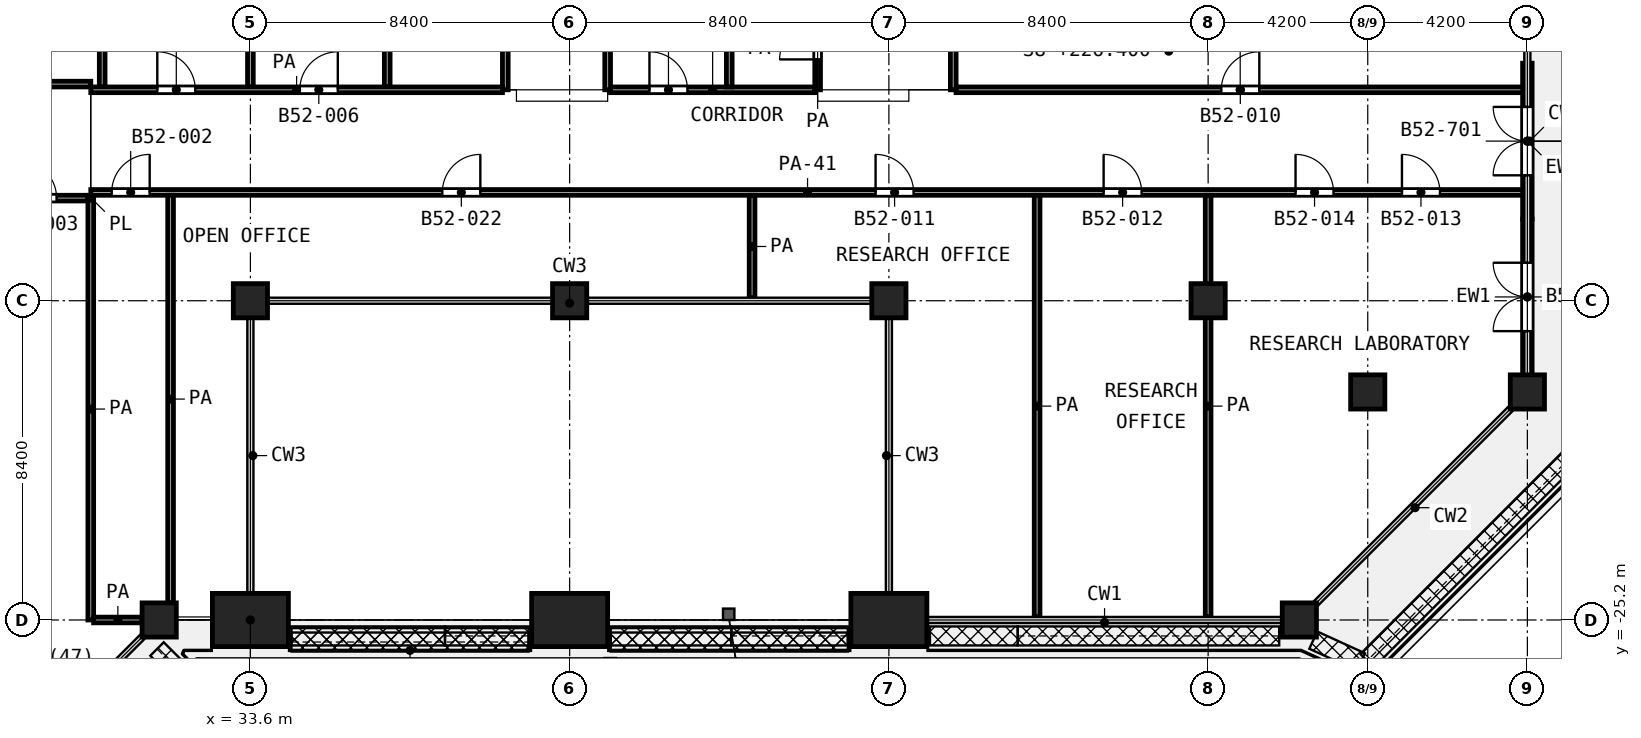
"""IFC4 building model, lengths in metres.
Left out: names, types, materials, properties, quantities, classifications, styles, units other than length and angle.
Written with IfcOpenShell. Run it as: python <this file> out.ifc"""

import sys

from ifc_helpers import new_model, si_unit, direction, frame, frame_2d, origin, origin_2d, place, context, subcontext, project, spatial, rectangle, extrude, element, fill, save


model = new_model("IFC4")
c1 = context("Model", 3, precision=1e-05, world=origin(), true_north=direction((0.0, 1.0)))
c2 = subcontext(c1, "Body", "Model", "MODEL_VIEW")
j1 = project(units=[si_unit("LENGTHUNIT", "METRE"), si_unit("PLANEANGLEUNIT", "RADIAN")], contexts=[c1])
p1 = place(None, origin())
s1 = spatial("IfcSite", under=j1, at=p1, CompositionType="ELEMENT")
p2 = place(p1, origin())
s2 = spatial("IfcBuilding", under=s1, at=p2, CompositionType="ELEMENT")
p3 = place(p2, frame((0.0, 0.0, 226.4)))
s3 = spatial("IfcBuildingStorey", under=s2, at=p3, CompositionType="ELEMENT", Elevation=226.4)
for number, where, z_axis, x_axis in (
    (1, (33.6, -16.8, 0.0), (0.0, 0.0, 1.0), (1.0, 0.0, 0.0)),
    (2, (42.0, -16.8, 0.0), (0.0, 0.0, 1.0), (1.0, 0.0, 0.0)),
    (3, (50.4, -16.8, 0.0), (0.0, 0.0, 1.0), (1.0, 0.0, 0.0)),
    (4, (58.8, -16.8, 0.0), (0.0, 0.0, 1.0), (1.0, 0.0, 0.0)),
    (5, (63.0, -19.2, 0.0), (0.0, 0.0, 1.0), (1.0, 0.0, 0.0)),
    (6, (67.2, -19.2, 0.0), (0.0, 0.0, 1.0), (1.0, 0.0, 0.0)),
    (7, (31.2, -25.2, 0.0), (0.0, 0.0, 1.0), (1.0, 0.0, 0.0)),
):
    element("IfcColumn", number, at=place(p3, frame(where, z_axis=z_axis, x_axis=x_axis)), inside=s3, PredefinedType="COLUMN", context=c2, shape_type="SweptSolid", body=[
        extrude(rectangle(XDim=0.9, YDim=0.9, at=origin_2d()), origin(), (0.0, 0.0, 1.0), 4.2),
    ])
for number, where, z_axis, x_axis in (
    (8, (42.0, -25.2, 0.0), (0.0, 0.0, 1.0), (-1.0, 0.0, 0.0)),
    (9, (50.4, -25.2, 0.0), (0.0, 0.0, 1.0), (-1.0, 0.0, 0.0)),
):
    element("IfcColumn", number, at=place(p3, frame(where, z_axis=z_axis, x_axis=x_axis)), inside=s3, PredefinedType="COLUMN", context=c2, shape_type="SweptSolid", body=[
        extrude(rectangle(XDim=2.0, YDim=1.4, at=origin_2d()), origin(), (0.0, 0.0, 1.0), 4.2),
    ])
p4 = place(p3, frame((61.2, -25.2, 0.0), z_axis=(0.0, 0.0, 1.0), x_axis=(1.0, 0.0, 0.0)))
e10 = element("IfcColumn", 10, at=p4, inside=s3, PredefinedType="COLUMN", context=c2, shape_type="SweptSolid", body=[
    extrude(rectangle(XDim=0.9, YDim=0.9, at=origin_2d()), origin(), (0.0, 0.0, 1.0), 4.2),
])
p5 = place(p3, frame((33.6, -25.2, 0.0), z_axis=(0.0, 0.0, 1.0), x_axis=(-1.0, 0.0, 0.0)))
e11 = element("IfcColumn", 11, at=p5, inside=s3, PredefinedType="COLUMN", context=c2, shape_type="SweptSolid", body=[
    extrude(rectangle(XDim=2.0, YDim=1.4, at=origin_2d()), origin(), (0.0, 0.0, 1.0), 4.2),
])
p6 = place(p3, frame((67.2, -18.75, 0.0), z_axis=(0.0, 0.0, 1.0), x_axis=(0.0, 1.0, 0.0)))
e12 = element("IfcWall", 12, at=p6, inside=s3, PredefinedType="SOLIDWALL", context=c2, shape_type="SweptSolid", body=[
    extrude(rectangle(XDim=4.1, YDim=0.25, at=frame_2d((2.05, 0.0))), origin(), (0.0, 0.0, 1.0), 3.48),
])
p7 = place(p6, frame((1.15, 0.0, 0.0)))
e13 = element("IfcOpeningElement", 13, at=p7, cuts=e12, PredefinedType="OPENING", context=c2, shape_type="SweptSolid", body=[
    extrude(rectangle(XDim=1.8, YDim=2.1, at=frame_2d((0.9, 1.05))), frame((0.0, 0.135, 0.0), z_axis=(0.0, -1.0, 0.0), x_axis=(1.0, 0.0, 0.0)), (0.0, 0.0, 1.0), 0.27),
])
p8 = place(p3, frame((67.2, -14.65, 0.0), z_axis=(0.0, 0.0, 1.0), x_axis=(0.0, 1.0, 0.0)))
e14 = element("IfcWall", 14, at=p8, inside=s3, PredefinedType="SOLIDWALL", context=c2, shape_type="SweptSolid", body=[
    extrude(rectangle(XDim=4.1, YDim=0.25, at=frame_2d((2.05, 0.0))), origin(), (0.0, 0.0, 1.0), 3.48),
])
p9 = place(p8, frame((1.15, 0.0, 0.0)))
e15 = element("IfcOpeningElement", 15, at=p9, cuts=e14, PredefinedType="OPENING", context=c2, shape_type="SweptSolid", body=[
    extrude(rectangle(XDim=1.8, YDim=2.1, at=frame_2d((0.9, 1.05))), frame((0.0, 0.135, 0.0), z_axis=(0.0, -1.0, 0.0), x_axis=(1.0, 0.0, 0.0)), (0.0, 0.0, 1.0), 0.27),
])
p10 = place(p3, frame((29.4, -14.147, 0.0), z_axis=(0.0, 0.0, 1.0), x_axis=(0.0, 1.0, 0.0)))
e16 = element("IfcWall", 16, at=p10, inside=s3, PredefinedType="PARTITIONING", context=c2, shape_type="SweptSolid", body=[
    extrude(rectangle(XDim=0.12, YDim=0.1, at=frame_2d((0.06, 0.0))), origin(), (0.0, 0.0, 1.0), 3.6),
])
p11 = place(p3, frame((29.475, -25.2, 0.0), z_axis=(0.0, 0.0, 1.0), x_axis=(1.0, 0.0, 0.0)))
e17 = element("IfcWall", 17, at=p11, inside=s3, PredefinedType="PARTITIONING", context=c2, shape_type="SweptSolid", body=[
    extrude(rectangle(XDim=1.275, YDim=0.15, at=frame_2d((0.637, 0.0))), origin(), (0.0, 0.0, 1.0), 3.6),
])
p12 = place(p3, frame((24.8, -14.1, 0.0), z_axis=(0.0, 0.0, 1.0), x_axis=(1.0, 0.0, 0.0)))
e18 = element("IfcWall", 18, at=p12, inside=s3, PredefinedType="PARTITIONING", context=c2, shape_type="SweptSolid", body=[
    extrude(rectangle(XDim=4.525, YDim=0.15, at=frame_2d((2.262, 0.0))), origin(), (0.0, 0.0, 1.0), 3.6),
])
p13 = place(p12, frame((2.7, 0.0, 0.0)))
e19 = element("IfcOpeningElement", 19, at=p13, cuts=e18, PredefinedType="OPENING", context=c2, shape_type="SweptSolid", body=[
    extrude(rectangle(XDim=1.0, YDim=2.1, at=frame_2d((0.5, 1.05))), frame((0.0, 0.085, 0.0), z_axis=(0.0, -1.0, 0.0), x_axis=(1.0, 0.0, 0.0)), (0.0, 0.0, 1.0), 0.17),
])
p14 = place(p12, frame((1.3, 0.0, 0.0)))
e20 = element("IfcOpeningElement", 20, at=p14, cuts=e18, PredefinedType="OPENING", context=c2, shape_type="SweptSolid", body=[
    extrude(rectangle(XDim=1.0, YDim=2.1, at=frame_2d((0.5, 1.05))), frame((0.0, 0.085, 0.0), z_axis=(0.0, -1.0, 0.0), x_axis=(1.0, 0.0, 0.0)), (0.0, 0.0, 1.0), 0.17),
])
p15 = place(p3, frame((29.4, -13.95, 0.0), z_axis=(0.0, 0.0, 1.0), x_axis=(1.0, 0.0, 0.0)))
e21 = element("IfcWall", 21, at=p15, inside=s3, PredefinedType="PARTITIONING", context=c2, shape_type="SweptSolid", body=[
    extrude(rectangle(XDim=37.72, YDim=0.15, at=frame_2d((18.86, 0.0))), origin(), (0.0, 0.0, 1.0), 2.7),
])
p16 = place(p15, frame((20.65, 0.0, 0.0)))
e22 = element("IfcOpeningElement", 22, at=p16, cuts=e21, PredefinedType="OPENING", context=c2, shape_type="SweptSolid", body=[
    extrude(rectangle(XDim=1.0, YDim=2.1, at=frame_2d((0.5, 1.05))), frame((0.0, 0.085, 0.0), z_axis=(0.0, -1.0, 0.0), x_axis=(1.0, 0.0, 0.0)), (0.0, 0.0, 1.0), 0.17),
])
p17 = place(p15, frame((26.65, 0.0, 0.0)))
e23 = element("IfcOpeningElement", 23, at=p17, cuts=e21, PredefinedType="OPENING", context=c2, shape_type="SweptSolid", body=[
    extrude(rectangle(XDim=1.0, YDim=2.1, at=frame_2d((0.5, 1.05))), frame((0.0, 0.085, 0.0), z_axis=(0.0, -1.0, 0.0), x_axis=(1.0, 0.0, 0.0)), (0.0, 0.0, 1.0), 0.17),
])
p18 = place(p15, frame((34.5, 0.0, 0.0)))
e24 = element("IfcOpeningElement", 24, at=p18, cuts=e21, PredefinedType="OPENING", context=c2, shape_type="SweptSolid", body=[
    extrude(rectangle(XDim=1.0, YDim=2.1, at=frame_2d((0.5, 1.05))), frame((0.0, 0.085, 0.0), z_axis=(0.0, -1.0, 0.0), x_axis=(1.0, 0.0, 0.0)), (0.0, 0.0, 1.0), 0.17),
])
p19 = place(p15, frame((31.7, 0.0, 0.0)))
e25 = element("IfcOpeningElement", 25, at=p19, cuts=e21, PredefinedType="OPENING", context=c2, shape_type="SweptSolid", body=[
    extrude(rectangle(XDim=1.0, YDim=2.1, at=frame_2d((0.5, 1.05))), frame((0.0, 0.085, 0.0), z_axis=(0.0, -1.0, 0.0), x_axis=(1.0, 0.0, 0.0)), (0.0, 0.0, 1.0), 0.17),
])
p20 = place(p15, frame((0.55, 0.0, 0.0)))
e26 = element("IfcOpeningElement", 26, at=p20, cuts=e21, PredefinedType="OPENING", context=c2, shape_type="SweptSolid", body=[
    extrude(rectangle(XDim=1.0, YDim=2.1, at=frame_2d((0.5, 1.05))), frame((0.0, 0.085, 0.0), z_axis=(0.0, -1.0, 0.0), x_axis=(1.0, 0.0, 0.0)), (0.0, 0.0, 1.0), 0.17),
])
p21 = place(p15, frame((9.25, 0.0, 0.0)))
e27 = element("IfcOpeningElement", 27, at=p21, cuts=e21, PredefinedType="OPENING", context=c2, shape_type="SweptSolid", body=[
    extrude(rectangle(XDim=1.0, YDim=2.1, at=frame_2d((0.5, 1.05))), frame((0.0, 0.085, 0.0), z_axis=(0.0, -1.0, 0.0), x_axis=(1.0, 0.0, 0.0)), (0.0, 0.0, 1.0), 0.17),
])
p22 = place(p3, frame((29.4, -11.25, 0.0), z_axis=(0.0, 0.0, 1.0), x_axis=(1.0, 0.0, 0.0)))
e28 = element("IfcWall", 28, at=p22, inside=s3, PredefinedType="PARTITIONING", context=c2, shape_type="SweptSolid", body=[
    extrude(rectangle(XDim=10.832, YDim=0.15, at=frame_2d((5.416, 0.0))), origin(), (0.0, 0.0, 1.0), 3.6),
])
p23 = place(p22, frame((1.75, 0.0, 0.0)))
e29 = element("IfcOpeningElement", 29, at=p23, cuts=e28, PredefinedType="OPENING", context=c2, shape_type="SweptSolid", body=[
    extrude(rectangle(XDim=1.0, YDim=2.1, at=frame_2d((0.5, 1.05))), frame((0.0, 0.085, 0.0), z_axis=(0.0, -1.0, 0.0), x_axis=(1.0, 0.0, 0.0)), (0.0, 0.0, 1.0), 0.17),
])
p24 = place(p22, frame((5.5, 0.0, 0.0)))
e30 = element("IfcOpeningElement", 30, at=p24, cuts=e28, PredefinedType="OPENING", context=c2, shape_type="SweptSolid", body=[
    extrude(rectangle(XDim=1.0, YDim=2.1, at=frame_2d((0.5, 1.05))), frame((0.0, 0.085, 0.0), z_axis=(0.0, -1.0, 0.0), x_axis=(1.0, 0.0, 0.0)), (0.0, 0.0, 1.0), 0.17),
])
p25 = place(p3, frame((43.075, -11.25, 0.0), z_axis=(0.0, 0.0, 1.0), x_axis=(1.0, 0.0, 0.0)))
e31 = element("IfcWall", 31, at=p25, inside=s3, PredefinedType="PARTITIONING", context=c2, shape_type="SweptSolid", body=[
    extrude(rectangle(XDim=5.375, YDim=0.15, at=frame_2d((2.688, 0.0))), origin(), (0.0, 0.0, 1.0), 3.6),
])
p26 = place(p25, frame((1.025, 0.0, 0.0)))
e32 = element("IfcOpeningElement", 32, at=p26, cuts=e31, PredefinedType="OPENING", context=c2, shape_type="SweptSolid", body=[
    extrude(rectangle(XDim=1.0, YDim=2.1, at=frame_2d((0.5, 1.05))), frame((0.0, 0.085, 0.0), z_axis=(0.0, -1.0, 0.0), x_axis=(1.0, 0.0, 0.0)), (0.0, 0.0, 1.0), 0.17),
])
p27 = place(p3, frame((52.168, -11.25, 0.0), z_axis=(0.0, 0.0, 1.0), x_axis=(1.0, 0.0, 0.0)))
e33 = element("IfcWall", 33, at=p27, inside=s3, PredefinedType="PARTITIONING", context=c2, shape_type="SweptSolid", body=[
    extrude(rectangle(XDim=14.952, YDim=0.15, at=frame_2d((7.476, 0.0))), origin(), (0.0, 0.0, 1.0), 2.7),
])
p28 = place(p27, frame((6.979, 0.0, 0.0)))
e34 = element("IfcOpeningElement", 34, at=p28, cuts=e33, PredefinedType="OPENING", context=c2, shape_type="SweptSolid", body=[
    extrude(rectangle(XDim=1.0, YDim=2.1, at=frame_2d((0.5, 1.05))), frame((0.0, 0.085, 0.0), z_axis=(0.0, -1.0, 0.0), x_axis=(1.0, 0.0, 0.0)), (0.0, 0.0, 1.0), 0.17),
])
p29 = place(p3, frame((24.8, -11.1, 0.0), z_axis=(0.0, 0.0, 1.0), x_axis=(1.0, 0.0, 0.0)))
e35 = element("IfcWall", 35, at=p29, inside=s3, PredefinedType="PARTITIONING", context=c2, shape_type="SweptSolid", body=[
    extrude(rectangle(XDim=4.6, YDim=0.15, at=frame_2d((2.3, 0.0))), origin(), (0.0, 0.0, 1.0), 3.6),
])
p30 = place(p29, frame((1.9, 0.0, 0.0)))
e36 = element("IfcOpeningElement", 36, at=p30, cuts=e35, PredefinedType="OPENING", context=c2, shape_type="SweptSolid", body=[
    extrude(rectangle(XDim=1.2, YDim=2.1, at=frame_2d((0.6, 1.05))), frame((0.0, 0.085, 0.0), z_axis=(0.0, -1.0, 0.0), x_axis=(1.0, 0.0, 0.0)), (0.0, 0.0, 1.0), 0.17),
])
p31 = place(p3, frame((29.4, -25.2, 0.0), z_axis=(0.0, 0.0, 1.0), x_axis=(0.0, 1.0, 0.0)))
e37 = element("IfcWall", 37, at=p31, inside=s3, PredefinedType="PARTITIONING", context=c2, shape_type="SweptSolid", body=[
    extrude(rectangle(XDim=11.1, YDim=0.15, at=frame_2d((5.55, 0.0))), origin(), (0.0, 0.0, 1.0), 3.6),
])
p32 = place(p3, frame((29.7, -11.175, 0.0), z_axis=(0.0, 0.0, 1.0), x_axis=(0.0, 1.0, 0.0)))
e38 = element("IfcWall", 38, at=p32, inside=s3, PredefinedType="PARTITIONING", context=c2, shape_type="SweptSolid", body=[
    extrude(rectangle(XDim=11.095, YDim=0.15, at=frame_2d((5.547, 0.0))), origin(), (0.0, 0.0, 1.0), 3.6),
])
p33 = place(p3, frame((31.5, -24.75, 0.0), z_axis=(0.0, 0.0, 1.0), x_axis=(0.0, 1.0, 0.0)))
e39 = element("IfcWall", 39, at=p33, inside=s3, PredefinedType="PARTITIONING", context=c2, shape_type="SweptSolid", body=[
    extrude(rectangle(XDim=10.725, YDim=0.15, at=frame_2d((5.363, 0.0))), origin(), (0.0, 0.0, 1.0), 3.6),
])
for number, where, z_axis, x_axis in (
    (40, (33.6, -11.175, 0.0), (0.0, 0.0, 1.0), (0.0, 1.0, 0.0)),
    (41, (37.2, -11.175, 0.0), (0.0, 0.0, 1.0), (0.0, 1.0, 0.0)),
):
    element("IfcWall", number, at=place(p3, frame(where, z_axis=z_axis, x_axis=x_axis)), inside=s3, PredefinedType="PARTITIONING", context=c2, shape_type="SweptSolid", body=[
        extrude(rectangle(XDim=11.095, YDim=0.15, at=frame_2d((5.547, 0.0))), origin(), (0.0, 0.0, 1.0), 3.6),
    ])
p34 = place(p3, frame((40.307, -11.25, 0.0), z_axis=(0.0, 0.0, 1.0), x_axis=(0.0, 1.0, 0.0)))
e42 = element("IfcWall", 42, at=p34, inside=s3, PredefinedType="PARTITIONING", context=c2, shape_type="SweptSolid", body=[
    extrude(rectangle(XDim=11.17, YDim=0.15, at=frame_2d((5.585, 0.0))), origin(), (0.0, 0.0, 1.0), 3.6),
])
p35 = place(p34, frame((5.125, 0.0, 0.0)))
e43 = element("IfcOpeningElement", 43, at=p35, cuts=e42, PredefinedType="OPENING", context=c2, shape_type="SweptSolid", body=[
    extrude(rectangle(XDim=1.0, YDim=2.1, at=frame_2d((0.5, 1.05))), frame((0.0, 0.085, 0.0), z_axis=(0.0, -1.0, 0.0), x_axis=(1.0, 0.0, 0.0)), (0.0, 0.0, 1.0), 0.17),
])
p36 = place(p3, frame((43.0, -11.25, 0.0), z_axis=(0.0, 0.0, 1.0), x_axis=(0.0, 1.0, 0.0)))
e44 = element("IfcWall", 44, at=p36, inside=s3, PredefinedType="PARTITIONING", context=c2, shape_type="SweptSolid", body=[
    extrude(rectangle(XDim=2.4, YDim=0.15, at=frame_2d((1.2, 0.0))), origin(), (0.0, 0.0, 1.0), 3.6),
])
p37 = place(p3, frame((46.2, -11.175, 0.0), z_axis=(0.0, 0.0, 1.0), x_axis=(0.0, 1.0, 0.0)))
e45 = element("IfcWall", 45, at=p37, inside=s3, PredefinedType="PARTITIONING", context=c2, shape_type="SweptSolid", body=[
    extrude(rectangle(XDim=2.525, YDim=0.15, at=frame_2d((1.263, 0.0))), origin(), (0.0, 0.0, 1.0), 3.6),
])
p38 = place(p3, frame((46.8, -16.72, 0.0), z_axis=(0.0, 0.0, 1.0), x_axis=(0.0, 1.0, 0.0)))
e46 = element("IfcWall", 46, at=p38, inside=s3, PredefinedType="PARTITIONING", context=c2, shape_type="SweptSolid", body=[
    extrude(rectangle(XDim=2.695, YDim=0.15, at=frame_2d((1.348, 0.0))), origin(), (0.0, 0.0, 1.0), 3.6),
])
p39 = place(p3, frame((48.525, -11.25, 0.0), z_axis=(0.0, 0.0, 1.0), x_axis=(0.0, 1.0, 0.0)))
e47 = element("IfcWall", 47, at=p39, inside=s3, PredefinedType="PARTITIONING", context=c2, shape_type="SweptSolid", body=[
    extrude(rectangle(XDim=2.6, YDim=0.15, at=frame_2d((1.3, 0.0))), origin(), (0.0, 0.0, 1.0), 3.6),
])
p40 = place(p39, frame((0.8, 0.0, 0.0)))
e48 = element("IfcOpeningElement", 48, at=p40, cuts=e47, PredefinedType="OPENING", context=c2, shape_type="SweptSolid", body=[
    extrude(rectangle(XDim=1.0, YDim=2.1, at=frame_2d((0.5, 1.05))), frame((0.0, 0.085, 0.0), z_axis=(0.0, -1.0, 0.0), x_axis=(1.0, 0.0, 0.0)), (0.0, 0.0, 1.0), 0.17),
])
p41 = place(p3, frame((52.093, -11.25, 0.0), z_axis=(0.0, 0.0, 1.0), x_axis=(0.0, 1.0, 0.0)))
e49 = element("IfcWall", 49, at=p41, inside=s3, PredefinedType="PARTITIONING", context=c2, shape_type="SweptSolid", body=[
    extrude(rectangle(XDim=9.399, YDim=0.15, at=frame_2d((4.699, 0.0))), origin(), (0.0, 0.0, 1.0), 3.6),
])
for number, where, z_axis, x_axis in (
    (50, (54.3, -25.12, 0.0), (0.0, 0.0, 1.0), (0.0, 1.0, 0.0)),
    (51, (58.8, -25.12, 0.0), (0.0, 0.0, 1.0), (0.0, 1.0, 0.0)),
):
    element("IfcWall", number, at=place(p3, frame(where, z_axis=z_axis, x_axis=x_axis)), inside=s3, PredefinedType="PARTITIONING", context=c2, shape_type="SweptSolid", body=[
        extrude(rectangle(XDim=11.095, YDim=0.15, at=frame_2d((5.548, 0.0))), origin(), (0.0, 0.0, 1.0), 3.6),
    ])
p42 = place(p7, origin())
e52 = element("IfcDoor", 52, at=p42, inside=s3, OperationType="DOUBLE_DOOR_SINGLE_SWING", PredefinedType="DOOR", context=c2, shape_type="SweptSolid", body=[
    extrude(rectangle(XDim=1.8, YDim=2.1, at=frame_2d((0.9, 1.05))), frame((0.0, 0.025, 0.0), z_axis=(0.0, -1.0, 0.0), x_axis=(1.0, 0.0, 0.0)), (0.0, 0.0, 1.0), 0.05),
])
fill(e13, e52)
p43 = place(p9, origin())
e53 = element("IfcDoor", 53, at=p43, inside=s3, OperationType="DOUBLE_DOOR_SINGLE_SWING", PredefinedType="DOOR", context=c2, shape_type="SweptSolid", body=[
    extrude(rectangle(XDim=1.8, YDim=2.1, at=frame_2d((0.9, 1.05))), frame((0.0, 0.025, 0.0), z_axis=(0.0, -1.0, 0.0), x_axis=(1.0, 0.0, 0.0)), (0.0, 0.0, 1.0), 0.05),
])
fill(e15, e53)
p44 = place(p13, origin())
e54 = element("IfcDoor", 54, at=p44, inside=s3, OperationType="SINGLE_SWING_LEFT", PredefinedType="DOOR", context=c2, shape_type="SweptSolid", body=[
    extrude(rectangle(XDim=1.0, YDim=2.1, at=frame_2d((0.5, 1.05))), frame((0.0, 0.025, 0.0), z_axis=(0.0, -1.0, 0.0), x_axis=(1.0, 0.0, 0.0)), (0.0, 0.0, 1.0), 0.05),
])
fill(e19, e54)
p45 = place(p23, origin())
e55 = element("IfcDoor", 55, at=p45, inside=s3, OperationType="SINGLE_SWING_LEFT", PredefinedType="DOOR", context=c2, shape_type="SweptSolid", body=[
    extrude(rectangle(XDim=1.0, YDim=2.1, at=frame_2d((0.5, 1.05))), frame((0.0, 0.025, 0.0), z_axis=(0.0, -1.0, 0.0), x_axis=(1.0, 0.0, 0.0)), (0.0, 0.0, 1.0), 0.05),
])
fill(e29, e55)
p46 = place(p24, origin())
e56 = element("IfcDoor", 56, at=p46, inside=s3, OperationType="SINGLE_SWING_RIGHT", PredefinedType="DOOR", context=c2, shape_type="SweptSolid", body=[
    extrude(rectangle(XDim=1.0, YDim=2.1, at=frame_2d((0.5, 1.05))), frame((0.0, 0.025, 0.0), z_axis=(0.0, -1.0, 0.0), x_axis=(1.0, 0.0, 0.0)), (0.0, 0.0, 1.0), 0.05),
])
fill(e30, e56)
p47 = place(p26, origin())
e57 = element("IfcDoor", 57, at=p47, inside=s3, OperationType="SINGLE_SWING_LEFT", PredefinedType="DOOR", context=c2, shape_type="SweptSolid", body=[
    extrude(rectangle(XDim=1.0, YDim=2.1, at=frame_2d((0.5, 1.05))), frame((0.0, 0.025, 0.0), z_axis=(0.0, -1.0, 0.0), x_axis=(1.0, 0.0, 0.0)), (0.0, 0.0, 1.0), 0.05),
])
fill(e32, e57)
p48 = place(p40, origin())
e58 = element("IfcDoor", 58, at=p48, inside=s3, OperationType="SINGLE_SWING_LEFT", PredefinedType="DOOR", context=c2, shape_type="SweptSolid", body=[
    extrude(rectangle(XDim=1.0, YDim=2.1, at=frame_2d((0.5, 1.05))), frame((0.0, 0.025, 0.0), z_axis=(0.0, -1.0, 0.0), x_axis=(1.0, 0.0, 0.0)), (0.0, 0.0, 1.0), 0.05),
])
fill(e48, e58)
p49 = place(p28, origin())
e59 = element("IfcDoor", 59, at=p49, inside=s3, OperationType="SINGLE_SWING_RIGHT", PredefinedType="DOOR", context=c2, shape_type="SweptSolid", body=[
    extrude(rectangle(XDim=1.0, YDim=2.1, at=frame_2d((0.5, 1.05))), frame((0.0, 0.025, 0.0), z_axis=(0.0, -1.0, 0.0), x_axis=(1.0, 0.0, 0.0)), (0.0, 0.0, 1.0), 0.05),
])
fill(e34, e59)
p50 = place(p16, origin())
e60 = element("IfcDoor", 60, at=p50, inside=s3, OperationType="SINGLE_SWING_LEFT", PredefinedType="DOOR", context=c2, shape_type="SweptSolid", body=[
    extrude(rectangle(XDim=1.0, YDim=2.1, at=frame_2d((0.5, 1.05))), frame((0.0, 0.025, 0.0), z_axis=(0.0, -1.0, 0.0), x_axis=(1.0, 0.0, 0.0)), (0.0, 0.0, 1.0), 0.05),
])
fill(e22, e60)
p51 = place(p17, origin())
e61 = element("IfcDoor", 61, at=p51, inside=s3, OperationType="SINGLE_SWING_LEFT", PredefinedType="DOOR", context=c2, shape_type="SweptSolid", body=[
    extrude(rectangle(XDim=1.0, YDim=2.1, at=frame_2d((0.5, 1.05))), frame((0.0, 0.025, 0.0), z_axis=(0.0, -1.0, 0.0), x_axis=(1.0, 0.0, 0.0)), (0.0, 0.0, 1.0), 0.05),
])
fill(e23, e61)
p52 = place(p18, origin())
e62 = element("IfcDoor", 62, at=p52, inside=s3, OperationType="SINGLE_SWING_LEFT", PredefinedType="DOOR", context=c2, shape_type="SweptSolid", body=[
    extrude(rectangle(XDim=1.0, YDim=2.1, at=frame_2d((0.5, 1.05))), frame((0.0, 0.025, 0.0), z_axis=(0.0, -1.0, 0.0), x_axis=(1.0, 0.0, 0.0)), (0.0, 0.0, 1.0), 0.05),
])
fill(e24, e62)
p53 = place(p19, origin())
e63 = element("IfcDoor", 63, at=p53, inside=s3, OperationType="SINGLE_SWING_LEFT", PredefinedType="DOOR", context=c2, shape_type="SweptSolid", body=[
    extrude(rectangle(XDim=1.0, YDim=2.1, at=frame_2d((0.5, 1.05))), frame((0.0, 0.025, 0.0), z_axis=(0.0, -1.0, 0.0), x_axis=(1.0, 0.0, 0.0)), (0.0, 0.0, 1.0), 0.05),
])
fill(e25, e63)
p54 = place(p20, origin())
e64 = element("IfcDoor", 64, at=p54, inside=s3, OperationType="SINGLE_SWING_RIGHT", PredefinedType="DOOR", context=c2, shape_type="SweptSolid", body=[
    extrude(rectangle(XDim=1.0, YDim=2.1, at=frame_2d((0.5, 1.05))), frame((0.0, 0.025, 0.0), z_axis=(0.0, -1.0, 0.0), x_axis=(1.0, 0.0, 0.0)), (0.0, 0.0, 1.0), 0.05),
])
fill(e26, e64)
p55 = place(p21, origin())
e65 = element("IfcDoor", 65, at=p55, inside=s3, OperationType="SINGLE_SWING_RIGHT", PredefinedType="DOOR", context=c2, shape_type="SweptSolid", body=[
    extrude(rectangle(XDim=1.0, YDim=2.1, at=frame_2d((0.5, 1.05))), frame((0.0, 0.025, 0.0), z_axis=(0.0, -1.0, 0.0), x_axis=(1.0, 0.0, 0.0)), (0.0, 0.0, 1.0), 0.05),
])
fill(e27, e65)
save(model, sys.argv[1])
